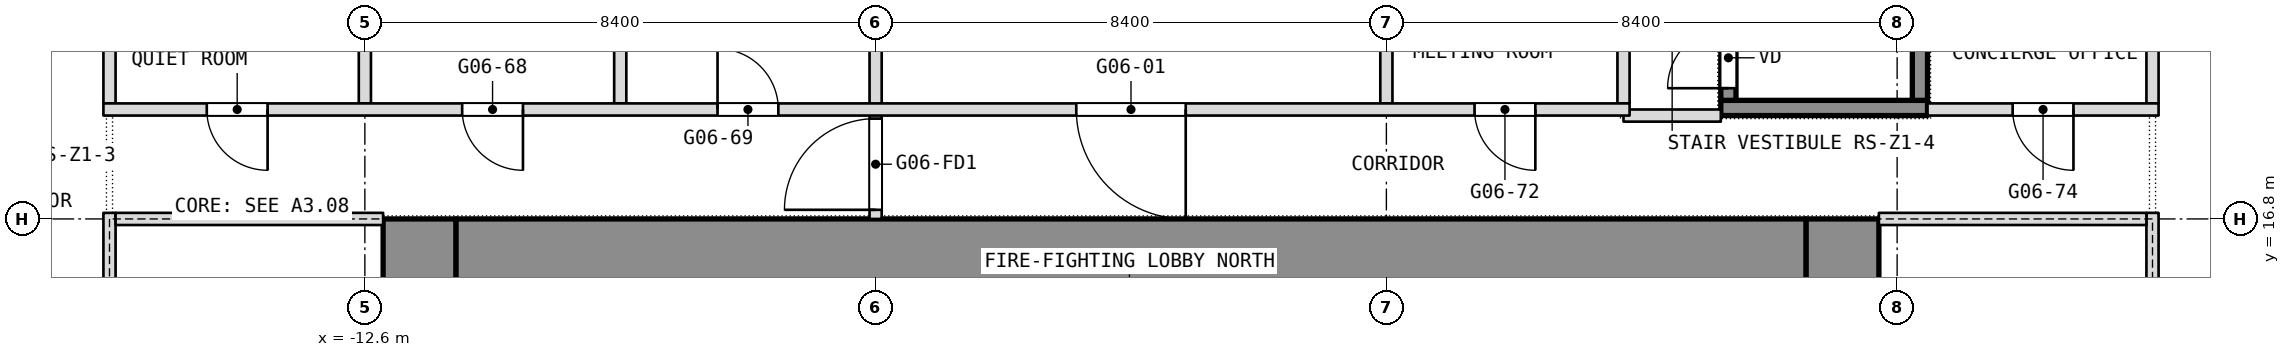
"""IFC4 building model, lengths in metres.
Left out: names, types, materials, properties, quantities, classifications, styles, units other than length and angle.
Written with IfcOpenShell. Run it as: python <this file> out.ifc"""

import sys

from ifc_helpers import new_model, si_unit, direction, frame, frame_2d, origin, place, context, subcontext, project, spatial, rectangle, extrude, element, fill, save


model = new_model("IFC4")
c1 = context("Model", 3, precision=1e-05, world=origin(), true_north=direction((0.0, 1.0)))
c2 = subcontext(c1, "Body", "Model", "MODEL_VIEW")
j1 = project(units=[si_unit("LENGTHUNIT", "METRE"), si_unit("PLANEANGLEUNIT", "RADIAN")], contexts=[c1])
p1 = place(None, origin())
s1 = spatial("IfcSite", under=j1, at=p1, CompositionType="ELEMENT")
p2 = place(p1, origin())
s2 = spatial("IfcBuilding", under=s1, at=p2, CompositionType="ELEMENT")
p3 = place(p2, frame((0.0, 0.0, 76.1)))
s3 = spatial("IfcBuildingStorey", under=s2, at=p3, CompositionType="ELEMENT", Elevation=76.1)
p4 = place(p3, frame((11.7, 0.0, 0.0), z_axis=(0.0, 0.0, 1.0), x_axis=(0.0, 1.0, 0.0)))
e1 = element("IfcWall", 1, at=p4, inside=s3, PredefinedType="SHEAR", context=c2, shape_type="SweptSolid", body=[
    extrude(rectangle(XDim=16.8, YDim=1.2, at=frame_2d((8.4, 0.0))), origin(), (0.0, 0.0, 1.0), 3.6),
])
p5 = place(p4, frame((1.688, 0.0, 0.0)))
e2 = element("IfcOpeningElement", 2, at=p5, cuts=e1, PredefinedType="OPENING", context=c2, shape_type="SweptSolid", body=[
    extrude(rectangle(XDim=0.9, YDim=2.1, at=frame_2d((0.45, 1.05))), frame((0.0, 0.6, 0.0), z_axis=(0.0, -1.0, 0.0), x_axis=(1.0, 0.0, 0.0)), (0.0, 0.0, 1.0), 1.2),
])
p6 = place(p4, frame((4.312, 0.0, 0.0)))
e3 = element("IfcOpeningElement", 3, at=p6, cuts=e1, PredefinedType="OPENING", context=c2, shape_type="SweptSolid", body=[
    extrude(rectangle(XDim=0.9, YDim=2.1, at=frame_2d((0.45, 1.05))), frame((0.0, 0.6, 0.0), z_axis=(0.0, -1.0, 0.0), x_axis=(1.0, 0.0, 0.0)), (0.0, 0.0, 1.0), 1.2),
])
p7 = place(p4, frame((6.825, 0.0, 0.0)))
e4 = element("IfcOpeningElement", 4, at=p7, cuts=e1, PredefinedType="OPENING", context=c2, shape_type="SweptSolid", body=[
    extrude(rectangle(XDim=1.2, YDim=2.1, at=frame_2d((0.6, 1.05))), frame((0.0, 0.6, 0.0), z_axis=(0.0, -1.0, 0.0), x_axis=(1.0, 0.0, 0.0)), (0.0, 0.0, 1.0), 1.2),
])
p8 = place(p4, frame((14.212, 0.0, 0.0)))
e5 = element("IfcOpeningElement", 5, at=p8, cuts=e1, PredefinedType="OPENING", context=c2, shape_type="SweptSolid", body=[
    extrude(rectangle(XDim=0.9, YDim=2.1, at=frame_2d((0.45, 1.05))), frame((0.0, 0.6, 0.0), z_axis=(0.0, -1.0, 0.0), x_axis=(1.0, 0.0, 0.0)), (0.0, 0.0, 1.0), 1.2),
])
p9 = place(p4, frame((11.587, 0.0, 0.0)))
e6 = element("IfcOpeningElement", 6, at=p9, cuts=e1, PredefinedType="OPENING", context=c2, shape_type="SweptSolid", body=[
    extrude(rectangle(XDim=0.9, YDim=2.1, at=frame_2d((0.45, 1.05))), frame((0.0, 0.6, 0.0), z_axis=(0.0, -1.0, 0.0), x_axis=(1.0, 0.0, 0.0)), (0.0, 0.0, 1.0), 1.2),
])
p10 = place(p4, frame((8.775, 0.0, 0.0)))
e7 = element("IfcOpeningElement", 7, at=p10, cuts=e1, PredefinedType="OPENING", context=c2, shape_type="SweptSolid", body=[
    extrude(rectangle(XDim=1.2, YDim=2.1, at=frame_2d((0.6, 1.05))), frame((0.0, 0.6, 0.0), z_axis=(0.0, -1.0, 0.0), x_axis=(1.0, 0.0, 0.0)), (0.0, 0.0, 1.0), 1.2),
])
p11 = place(p3, frame((-11.7, 0.0, 0.0), z_axis=(0.0, 0.0, 1.0), x_axis=(0.0, 1.0, 0.0)))
e8 = element("IfcWall", 8, at=p11, inside=s3, PredefinedType="SHEAR", context=c2, shape_type="SweptSolid", body=[
    extrude(rectangle(XDim=16.8, YDim=1.2, at=frame_2d((8.4, 0.0))), origin(), (0.0, 0.0, 1.0), 3.6),
])
p12 = place(p11, frame((2.3, 0.0, 0.0)))
e9 = element("IfcOpeningElement", 9, at=p12, cuts=e8, PredefinedType="OPENING", context=c2, shape_type="SweptSolid", body=[
    extrude(rectangle(XDim=1.1, YDim=2.1, at=frame_2d((0.55, 1.05))), frame((0.0, 0.6, 0.0), z_axis=(0.0, -1.0, 0.0), x_axis=(1.0, 0.0, 0.0)), (0.0, 0.0, 1.0), 1.2),
])
p13 = place(p11, frame((4.85, 0.0, 0.0)))
e10 = element("IfcOpeningElement", 10, at=p13, cuts=e8, PredefinedType="OPENING", context=c2, shape_type="SweptSolid", body=[
    extrude(rectangle(XDim=1.1, YDim=2.1, at=frame_2d((0.55, 1.05))), frame((0.0, 0.6, 0.0), z_axis=(0.0, -1.0, 0.0), x_axis=(1.0, 0.0, 0.0)), (0.0, 0.0, 1.0), 1.2),
])
p14 = place(p11, frame((6.825, 0.0, 0.0)))
e11 = element("IfcOpeningElement", 11, at=p14, cuts=e8, PredefinedType="OPENING", context=c2, shape_type="SweptSolid", body=[
    extrude(rectangle(XDim=1.2, YDim=2.1, at=frame_2d((0.6, 1.05))), frame((0.0, 0.6, 0.0), z_axis=(0.0, -1.0, 0.0), x_axis=(1.0, 0.0, 0.0)), (0.0, 0.0, 1.0), 1.2),
])
p15 = place(p11, frame((13.4, 0.0, 0.0)))
e12 = element("IfcOpeningElement", 12, at=p15, cuts=e8, PredefinedType="OPENING", context=c2, shape_type="SweptSolid", body=[
    extrude(rectangle(XDim=1.1, YDim=2.1, at=frame_2d((0.55, 1.05))), frame((0.0, 0.6, 0.0), z_axis=(0.0, -1.0, 0.0), x_axis=(1.0, 0.0, 0.0)), (0.0, 0.0, 1.0), 1.2),
])
p16 = place(p11, frame((10.85, 0.0, 0.0)))
e13 = element("IfcOpeningElement", 13, at=p16, cuts=e8, PredefinedType="OPENING", context=c2, shape_type="SweptSolid", body=[
    extrude(rectangle(XDim=1.1, YDim=2.1, at=frame_2d((0.55, 1.05))), frame((0.0, 0.6, 0.0), z_axis=(0.0, -1.0, 0.0), x_axis=(1.0, 0.0, 0.0)), (0.0, 0.0, 1.0), 1.2),
])
p17 = place(p11, frame((8.775, 0.0, 0.0)))
e14 = element("IfcOpeningElement", 14, at=p17, cuts=e8, PredefinedType="OPENING", context=c2, shape_type="SweptSolid", body=[
    extrude(rectangle(XDim=1.2, YDim=2.1, at=frame_2d((0.6, 1.05))), frame((0.0, 0.6, 0.0), z_axis=(0.0, -1.0, 0.0), x_axis=(1.0, 0.0, 0.0)), (0.0, 0.0, 1.0), 1.2),
])
p18 = place(p3, frame((-11.1, 16.2, 0.0), z_axis=(0.0, 0.0, 1.0), x_axis=(1.0, 0.0, 0.0)))
e15 = element("IfcWall", 15, at=p18, inside=s3, PredefinedType="SHEAR", context=c2, shape_type="SweptSolid", body=[
    extrude(rectangle(XDim=22.2, YDim=1.2, at=frame_2d((11.1, 0.0))), origin(), (0.0, 0.0, 1.0), 3.6),
])
p19 = place(p3, frame((16.8, 18.7, 0.0), z_axis=(0.0, 0.0, 1.0), x_axis=(0.0, 1.0, 0.0)))
e16 = element("IfcWall", 16, at=p19, inside=s3, PredefinedType="PARTITIONING", context=c2, shape_type="SweptSolid", body=[
    extrude(rectangle(XDim=3.0, YDim=0.2, at=frame_2d((1.5, 0.0))), origin(), (0.0, 0.0, 1.0), 3.34),
])
for number, where, z_axis, x_axis in (
    (17, (8.1, 18.7, 0.0), (0.0, 0.0, 1.0), (0.0, 1.0, 0.0)),
    (18, (4.2, 18.7, 0.0), (0.0, 0.0, 1.0), (0.0, 1.0, 0.0)),
):
    element("IfcWall", number, at=place(p3, frame(where, z_axis=z_axis, x_axis=x_axis)), inside=s3, PredefinedType="PARTITIONING", context=c2, shape_type="SweptSolid", body=[
        extrude(rectangle(XDim=2.8, YDim=0.2, at=frame_2d((1.4, 0.0))), origin(), (0.0, 0.0, 1.0), 3.34),
    ])
p20 = place(p3, frame((-4.2, 16.8, 0.0), z_axis=(0.0, 0.0, 1.0), x_axis=(0.0, 1.0, 0.0)))
e19 = element("IfcWall", 19, at=p20, inside=s3, PredefinedType="PARTITIONING", context=c2, shape_type="SweptSolid", body=[
    extrude(rectangle(XDim=6.7, YDim=0.2, at=frame_2d((3.35, 0.0))), origin(), (0.0, 0.0, 1.0), 3.34),
])
p21 = place(p20, frame((0.15, 0.0, 0.0)))
e20 = element("IfcOpeningElement", 20, at=p21, cuts=e19, PredefinedType="OPENING", context=c2, shape_type="SweptSolid", body=[
    extrude(rectangle(XDim=1.5, YDim=2.1, at=frame_2d((0.75, 1.05))), frame((0.0, 0.1, 0.0), z_axis=(0.0, -1.0, 0.0), x_axis=(1.0, 0.0, 0.0)), (0.0, 0.0, 1.0), 0.2),
])
p22 = place(p20, frame((4.95, 0.0, 0.0)))
e21 = element("IfcOpeningElement", 21, at=p22, cuts=e19, PredefinedType="OPENING", context=c2, shape_type="SweptSolid", body=[
    extrude(rectangle(XDim=1.5, YDim=2.1, at=frame_2d((0.75, 1.05))), frame((0.0, 0.1, 0.0), z_axis=(0.0, -1.0, 0.0), x_axis=(1.0, 0.0, 0.0)), (0.0, 0.0, 1.0), 0.2),
])
for number, where, z_axis, x_axis in (
    (22, (-8.4, 18.7, 0.0), (0.0, 0.0, 1.0), (0.0, 1.0, 0.0)),
    (23, (-12.6, 18.7, 0.0), (0.0, 0.0, 1.0), (0.0, 1.0, 0.0)),
):
    element("IfcWall", number, at=place(p3, frame(where, z_axis=z_axis, x_axis=x_axis)), inside=s3, PredefinedType="PARTITIONING", context=c2, shape_type="SweptSolid", body=[
        extrude(rectangle(XDim=2.8, YDim=0.2, at=frame_2d((1.4, 0.0))), origin(), (0.0, 0.0, 1.0), 3.34),
    ])
p23 = place(p3, frame((-16.8, 18.7, 0.0), z_axis=(0.0, 0.0, 1.0), x_axis=(0.0, 1.0, 0.0)))
e24 = element("IfcWall", 24, at=p23, inside=s3, PredefinedType="PARTITIONING", context=c2, shape_type="SweptSolid", body=[
    extrude(rectangle(XDim=3.0, YDim=0.2, at=frame_2d((1.5, 0.0))), origin(), (0.0, 0.0, 1.0), 3.34),
])
p24 = place(p3, frame((8.1, 18.5, 0.0), z_axis=(0.0, 0.0, 1.0), x_axis=(1.0, 0.0, 0.0)))
e25 = element("IfcWall", 25, at=p24, inside=s3, PredefinedType="PARTITIONING", context=c2, shape_type="SweptSolid", body=[
    extrude(rectangle(XDim=1.6, YDim=0.2, at=frame_2d((0.8, 0.0))), origin(), (0.0, 0.0, 1.0), 3.34),
])
p25 = place(p3, frame((-16.9, 18.6, 0.0), z_axis=(0.0, 0.0, 1.0), x_axis=(1.0, 0.0, 0.0)))
e26 = element("IfcWall", 26, at=p25, inside=s3, PredefinedType="PARTITIONING", context=c2, shape_type="SweptSolid", body=[
    extrude(rectangle(XDim=25.1, YDim=0.2, at=frame_2d((12.55, 0.0))), origin(), (0.0, 0.0, 1.0), 3.34),
])
p26 = place(p25, frame((16.0, 0.0, 0.0)))
e27 = element("IfcOpeningElement", 27, at=p26, cuts=e26, PredefinedType="OPENING", context=c2, shape_type="SweptSolid", body=[
    extrude(rectangle(XDim=1.8, YDim=2.1, at=frame_2d((0.9, 1.05))), frame((0.0, 0.1, 0.0), z_axis=(0.0, -1.0, 0.0), x_axis=(1.0, 0.0, 0.0)), (0.0, 0.0, 1.0), 0.2),
])
p27 = place(p25, frame((5.9, 0.0, 0.0)))
e28 = element("IfcOpeningElement", 28, at=p27, cuts=e26, PredefinedType="OPENING", context=c2, shape_type="SweptSolid", body=[
    extrude(rectangle(XDim=1.0, YDim=2.1, at=frame_2d((0.5, 1.05))), frame((0.0, 0.1, 0.0), z_axis=(0.0, -1.0, 0.0), x_axis=(1.0, 0.0, 0.0)), (0.0, 0.0, 1.0), 0.2),
])
p28 = place(p25, frame((10.1, 0.0, 0.0)))
e29 = element("IfcOpeningElement", 29, at=p28, cuts=e26, PredefinedType="OPENING", context=c2, shape_type="SweptSolid", body=[
    extrude(rectangle(XDim=1.0, YDim=2.1, at=frame_2d((0.5, 1.05))), frame((0.0, 0.1, 0.0), z_axis=(0.0, -1.0, 0.0), x_axis=(1.0, 0.0, 0.0)), (0.0, 0.0, 1.0), 0.2),
])
p29 = place(p25, frame((1.7, 0.0, 0.0)))
e30 = element("IfcOpeningElement", 30, at=p29, cuts=e26, PredefinedType="OPENING", context=c2, shape_type="SweptSolid", body=[
    extrude(rectangle(XDim=1.0, YDim=2.1, at=frame_2d((0.5, 1.05))), frame((0.0, 0.1, 0.0), z_axis=(0.0, -1.0, 0.0), x_axis=(1.0, 0.0, 0.0)), (0.0, 0.0, 1.0), 0.2),
])
p30 = place(p25, frame((22.55, 0.0, 0.0)))
e31 = element("IfcOpeningElement", 31, at=p30, cuts=e26, PredefinedType="OPENING", context=c2, shape_type="SweptSolid", body=[
    extrude(rectangle(XDim=1.0, YDim=2.1, at=frame_2d((0.5, 1.05))), frame((0.0, 0.1, 0.0), z_axis=(0.0, -1.0, 0.0), x_axis=(1.0, 0.0, 0.0)), (0.0, 0.0, 1.0), 0.2),
])
p31 = place(p3, frame((13.1, 18.6, 0.0), z_axis=(0.0, 0.0, 1.0), x_axis=(1.0, 0.0, 0.0)))
e32 = element("IfcWall", 32, at=p31, inside=s3, PredefinedType="PARTITIONING", context=c2, shape_type="SweptSolid", body=[
    extrude(rectangle(XDim=3.8, YDim=0.2, at=frame_2d((1.9, 0.0))), origin(), (0.0, 0.0, 1.0), 3.34),
])
p32 = place(p31, frame((1.4, 0.0, 0.0)))
e33 = element("IfcOpeningElement", 33, at=p32, cuts=e32, PredefinedType="OPENING", context=c2, shape_type="SweptSolid", body=[
    extrude(rectangle(XDim=1.0, YDim=2.1, at=frame_2d((0.5, 1.05))), frame((0.0, 0.1, 0.0), z_axis=(0.0, -1.0, 0.0), x_axis=(1.0, 0.0, 0.0)), (0.0, 0.0, 1.0), 0.2),
])
p33 = place(p3, frame((-16.8, -0.1, 0.0), z_axis=(0.0, 0.0, 1.0), x_axis=(0.0, 1.0, 0.0)))
e34 = element("IfcWall", 34, at=p33, inside=s3, PredefinedType="PARTITIONING", context=c2, shape_type="SweptSolid", body=[
    extrude(rectangle(XDim=17.0, YDim=0.2, at=frame_2d((8.5, 0.0))), origin(), (0.0, 0.0, 1.0), 3.34),
])
p34 = place(p33, frame((2.2, 0.0, 0.0)))
e35 = element("IfcOpeningElement", 35, at=p34, cuts=e34, PredefinedType="OPENING", context=c2, shape_type="SweptSolid", body=[
    extrude(rectangle(XDim=1.8, YDim=2.1, at=frame_2d((0.9, 1.05))), frame((0.0, 0.1, 0.0), z_axis=(0.0, -1.0, 0.0), x_axis=(1.0, 0.0, 0.0)), (0.0, 0.0, 1.0), 0.2),
])
p35 = place(p33, frame((7.2, 0.0, 0.0)))
e36 = element("IfcOpeningElement", 36, at=p35, cuts=e34, PredefinedType="OPENING", context=c2, shape_type="SweptSolid", body=[
    extrude(rectangle(XDim=1.8, YDim=2.1, at=frame_2d((0.9, 1.05))), frame((0.0, 0.1, 0.0), z_axis=(0.0, -1.0, 0.0), x_axis=(1.0, 0.0, 0.0)), (0.0, 0.0, 1.0), 0.2),
])
p36 = place(p3, frame((-16.7, 16.8, 0.0), z_axis=(0.0, 0.0, 1.0), x_axis=(1.0, 0.0, 0.0)))
e37 = element("IfcWall", 37, at=p36, inside=s3, PredefinedType="PARTITIONING", context=c2, shape_type="SweptSolid", body=[
    extrude(rectangle(XDim=4.4, YDim=0.2, at=frame_2d((2.2, 0.0))), origin(), (0.0, 0.0, 1.0), 2.84),
])
p37 = place(p3, frame((16.8, -0.1, 0.0), z_axis=(0.0, 0.0, 1.0), x_axis=(0.0, 1.0, 0.0)))
e38 = element("IfcWall", 38, at=p37, inside=s3, PredefinedType="PARTITIONING", context=c2, shape_type="SweptSolid", body=[
    extrude(rectangle(XDim=17.0, YDim=0.2, at=frame_2d((8.5, 0.0))), origin(), (0.0, 0.0, 1.0), 3.34),
])
p38 = place(p37, frame((2.2, 0.0, 0.0)))
e39 = element("IfcOpeningElement", 39, at=p38, cuts=e38, PredefinedType="OPENING", context=c2, shape_type="SweptSolid", body=[
    extrude(rectangle(XDim=1.8, YDim=2.1, at=frame_2d((0.9, 1.05))), frame((0.0, 0.1, 0.0), z_axis=(0.0, -1.0, 0.0), x_axis=(1.0, 0.0, 0.0)), (0.0, 0.0, 1.0), 0.2),
])
p39 = place(p37, frame((13.0, 0.0, 0.0)))
e40 = element("IfcOpeningElement", 40, at=p39, cuts=e38, PredefinedType="OPENING", context=c2, shape_type="SweptSolid", body=[
    extrude(rectangle(XDim=1.8, YDim=2.1, at=frame_2d((0.9, 1.05))), frame((0.0, 0.1, 0.0), z_axis=(0.0, -1.0, 0.0), x_axis=(1.0, 0.0, 0.0)), (0.0, 0.0, 1.0), 0.2),
])
p40 = place(p3, frame((12.3, 16.8, 0.0), z_axis=(0.0, 0.0, 1.0), x_axis=(1.0, 0.0, 0.0)))
e41 = element("IfcWall", 41, at=p40, inside=s3, PredefinedType="PARTITIONING", context=c2, shape_type="SweptSolid", body=[
    extrude(rectangle(XDim=4.4, YDim=0.2, at=frame_2d((2.2, 0.0))), origin(), (0.0, 0.0, 1.0), 2.84),
])
p41 = place(p3, frame((9.7, 18.625, 0.1), z_axis=(0.0, 0.0, 1.0), x_axis=(1.0, 0.0, 0.0)))
e42 = element("IfcWall", 42, at=p41, inside=s3, PredefinedType="SHEAR", context=c2, shape_type="SweptSolid", body=[
    extrude(rectangle(XDim=3.4, YDim=0.25, at=frame_2d((1.7, 0.0))), origin(), (0.0, 0.0, 1.0), 3.6),
])
p42 = place(p3, frame((9.825, 18.75, 0.1), z_axis=(0.0, 0.0, 1.0), x_axis=(0.0, 1.0, 0.0)))
e43 = element("IfcWall", 43, at=p42, inside=s3, PredefinedType="SHEAR", context=c2, shape_type="SweptSolid", body=[
    extrude(rectangle(XDim=5.7, YDim=0.25, at=frame_2d((2.85, 0.0))), origin(), (0.0, 0.0, 1.0), 3.6),
])
p43 = place(p42, frame((0.2, 0.0, 0.0)))
e44 = element("IfcOpeningElement", 44, at=p43, cuts=e43, PredefinedType="OPENING", context=c2, shape_type="SweptSolid", body=[
    extrude(rectangle(XDim=1.0, YDim=2.1, at=frame_2d((0.5, 1.05))), frame((0.0, 0.125, 0.0), z_axis=(0.0, -1.0, 0.0), x_axis=(1.0, 0.0, 0.0)), (0.0, 0.0, 1.0), 0.25),
])
p44 = place(p3, frame((12.975, 18.75, 0.1), z_axis=(0.0, 0.0, 1.0), x_axis=(0.0, 1.0, 0.0)))
e45 = element("IfcWall", 45, at=p44, inside=s3, PredefinedType="SHEAR", context=c2, shape_type="SweptSolid", body=[
    extrude(rectangle(XDim=5.7, YDim=0.25, at=frame_2d((2.85, 0.0))), origin(), (0.0, 0.0, 1.0), 3.6),
])
p45 = place(p26, origin())
e46 = element("IfcDoor", 46, at=p45, inside=s3, OperationType="DOUBLE_DOOR_SINGLE_SWING", PredefinedType="DOOR", context=c2, shape_type="SweptSolid", body=[
    extrude(rectangle(XDim=1.8, YDim=2.1, at=frame_2d((0.9, 1.05))), frame((0.0, 0.025, 0.0), z_axis=(0.0, -1.0, 0.0), x_axis=(1.0, 0.0, 0.0)), (0.0, 0.0, 1.0), 0.05),
])
fill(e27, e46)
p46 = place(p27, origin())
e47 = element("IfcDoor", 47, at=p46, inside=s3, OperationType="SINGLE_SWING_RIGHT", PredefinedType="DOOR", context=c2, shape_type="SweptSolid", body=[
    extrude(rectangle(XDim=1.0, YDim=2.1, at=frame_2d((0.5, 1.05))), frame((0.0, 0.025, 0.0), z_axis=(0.0, -1.0, 0.0), x_axis=(1.0, 0.0, 0.0)), (0.0, 0.0, 1.0), 0.05),
])
fill(e28, e47)
p47 = place(p28, origin())
e48 = element("IfcDoor", 48, at=p47, inside=s3, OperationType="SINGLE_SWING_LEFT", PredefinedType="DOOR", context=c2, shape_type="SweptSolid", body=[
    extrude(rectangle(XDim=1.0, YDim=2.1, at=frame_2d((0.5, 1.05))), frame((0.0, 0.025, 0.0), z_axis=(0.0, -1.0, 0.0), x_axis=(1.0, 0.0, 0.0)), (0.0, 0.0, 1.0), 0.05),
])
fill(e29, e48)
p48 = place(p29, origin())
e49 = element("IfcDoor", 49, at=p48, inside=s3, OperationType="SINGLE_SWING_RIGHT", PredefinedType="DOOR", context=c2, shape_type="SweptSolid", body=[
    extrude(rectangle(XDim=1.0, YDim=2.1, at=frame_2d((0.5, 1.05))), frame((0.0, 0.025, 0.0), z_axis=(0.0, -1.0, 0.0), x_axis=(1.0, 0.0, 0.0)), (0.0, 0.0, 1.0), 0.05),
])
fill(e30, e49)
p49 = place(p30, origin())
e50 = element("IfcDoor", 50, at=p49, inside=s3, OperationType="SINGLE_SWING_RIGHT", PredefinedType="DOOR", context=c2, shape_type="SweptSolid", body=[
    extrude(rectangle(XDim=1.0, YDim=2.1, at=frame_2d((0.5, 1.05))), frame((0.0, 0.025, 0.0), z_axis=(0.0, -1.0, 0.0), x_axis=(1.0, 0.0, 0.0)), (0.0, 0.0, 1.0), 0.05),
])
fill(e31, e50)
p50 = place(p32, origin())
e51 = element("IfcDoor", 51, at=p50, inside=s3, OperationType="SINGLE_SWING_LEFT", PredefinedType="DOOR", context=c2, shape_type="SweptSolid", body=[
    extrude(rectangle(XDim=1.0, YDim=2.1, at=frame_2d((0.5, 1.05))), frame((0.0, 0.025, 0.0), z_axis=(0.0, -1.0, 0.0), x_axis=(1.0, 0.0, 0.0)), (0.0, 0.0, 1.0), 0.05),
])
fill(e33, e51)
p51 = place(p43, origin())
e52 = element("IfcDoor", 52, at=p51, inside=s3, OperationType="SINGLE_SWING_LEFT", PredefinedType="DOOR", context=c2, shape_type="SweptSolid", body=[
    extrude(rectangle(XDim=1.0, YDim=2.1, at=frame_2d((0.5, 1.05))), frame((0.0, 0.025, 0.0), z_axis=(0.0, -1.0, 0.0), x_axis=(1.0, 0.0, 0.0)), (0.0, 0.0, 1.0), 0.05),
])
fill(e44, e52)
p52 = place(p21, origin())
e53 = element("IfcDoor", 53, at=p52, inside=s3, OperationType="DOUBLE_DOOR_DOUBLE_SWING", PredefinedType="DOOR", context=c2, shape_type="SweptSolid", body=[
    extrude(rectangle(XDim=1.5, YDim=2.1, at=frame_2d((0.75, 1.05))), frame((0.0, 0.025, 0.0), z_axis=(0.0, -1.0, 0.0), x_axis=(1.0, 0.0, 0.0)), (0.0, 0.0, 1.0), 0.05),
])
fill(e20, e53)
save(model, sys.argv[1])
